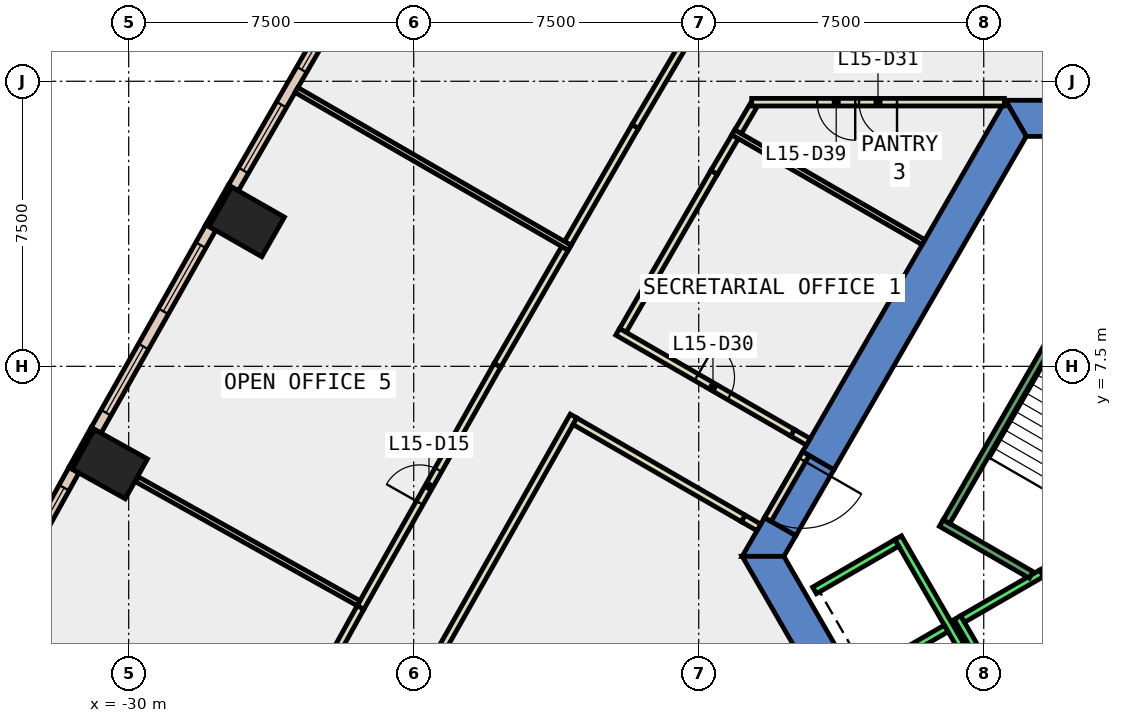
"""IFC4 building model, lengths in metres.
Left out: names, types, materials, properties, quantities, classifications, styles, units other than length and angle.
Written with IfcOpenShell. Run it as: python <this file> out.ifc"""

import sys

from ifc_helpers import new_model, si_unit, direction, frame, frame_2d, origin, origin_2d, place, context, subcontext, project, spatial, polyline, rectangle, outline, extrude, element, fill, save


model = new_model("IFC4")
c1 = context("Model", 3, precision=1e-05, world=origin(), true_north=direction((0.0, 1.0)))
c2 = subcontext(c1, "Body", "Model", "MODEL_VIEW")
j1 = project(units=[si_unit("LENGTHUNIT", "METRE"), si_unit("PLANEANGLEUNIT", "RADIAN")], contexts=[c1])
p1 = place(None, origin())
s1 = spatial("IfcSite", under=j1, at=p1, CompositionType="ELEMENT")
p2 = place(p1, origin())
s2 = spatial("IfcBuilding", under=s1, at=p2, CompositionType="ELEMENT")
p3 = place(p2, frame((0.0, 0.0, 72.8)))
s3 = spatial("IfcBuildingStorey", under=s2, at=p3, CompositionType="ELEMENT", Elevation=72.8)
for number, where, z_axis, x_axis in (
    (1, (-26.894, 11.301, -0.4), (0.0, 0.0, 1.0), (0.496, 0.869, 0.0)),
    (2, (-30.497, 4.928, -0.4), (0.0, 0.0, 1.0), (0.487, 0.873, 0.0)),
):
    element("IfcColumn", number, at=place(p3, frame(where, z_axis=z_axis, x_axis=x_axis)), inside=s3, PredefinedType="COLUMN", context=c2, shape_type="SweptSolid", body=[
        extrude(rectangle(XDim=1.2, YDim=1.6, at=origin_2d()), origin(), (0.0, 0.0, 1.0), 4.2),
    ])
p4 = place(p3, frame((0.0, 0.0, -0.4)))
e3 = element("IfcWall", 3, at=p4, inside=s3, PredefinedType="SHEAR", context=c2, shape_type="SweptSolid", body=[
    extrude(outline(polyline([(-4.55, 13.55), (-4.55, 14.5), (-6.928, 14.5), (-6.38, 13.55), (-4.55, 13.55)])), origin(), (0.0, 0.0, 1.0), 4.2),
])
p5 = place(p3, frame((0.0, 0.0, -0.4)))
e4 = element("IfcWall", 4, at=p5, inside=s3, PredefinedType="SHEAR", context=c2, shape_type="SweptSolid", body=[
    extrude(outline(polyline([(-12.267, 5.252), (-11.444, 4.777), (-6.38, 13.55), (-6.928, 14.5), (-12.267, 5.252)])), origin(), (0.0, 0.0, 1.0), 4.2),
])
p6 = place(p3, frame((0.0, 0.0, -0.4)))
e5 = element("IfcWall", 5, at=p6, inside=s3, PredefinedType="SHEAR", context=c2, shape_type="SweptSolid", body=[
    extrude(outline(polyline([(-12.444, 3.045), (-13.267, 3.52), (-13.856, 2.5), (-12.759, 2.5), (-12.444, 3.045)])), origin(), (0.0, 0.0, 1.0), 4.2),
])
p7 = place(p3, frame((0.0, 0.0, 3.6)))
e6 = element("IfcWall", 6, at=p7, inside=s3, PredefinedType="SHEAR", context=c2, shape_type="SweptSolid", body=[
    extrude(outline(polyline([(-13.267, 3.52), (-12.444, 3.045), (-11.444, 4.777), (-12.267, 5.252), (-13.267, 3.52)])), origin(), (0.0, 0.0, 1.0), 0.2),
])
p8 = place(p3, frame((0.0, 0.0, -0.4)))
e7 = element("IfcWall", 7, at=p8, inside=s3, PredefinedType="SHEAR", context=c2, shape_type="SweptSolid", body=[
    extrude(outline(polyline([(-13.856, 2.5), (-6.928, -9.5), (-6.38, -8.55), (-12.759, 2.5), (-13.856, 2.5)])), origin(), (0.0, 0.0, 1.0), 4.2),
])
p9 = place(p3, frame((-27.335, 12.243, 0.0), z_axis=(0.0, 0.0, 1.0), x_axis=(-0.495854054996, -0.868405870629, 0.0)))
e8 = element("IfcWall", 8, at=p9, inside=s3, PredefinedType="STANDARD", context=c2, shape_type="SweptSolid", body=[
    extrude(rectangle(XDim=1.2, YDim=0.1, at=frame_2d((0.6, 0.0))), origin(), (0.0, 0.0, 1.0), 3.8),
])
p10 = place(p3, frame((-30.947, 5.866, 0.0), z_axis=(0.0, 0.0, 1.0), x_axis=(-0.486817526853, -0.873503689488, 0.0)))
e9 = element("IfcWall", 9, at=p10, inside=s3, PredefinedType="STANDARD", context=c2, shape_type="SweptSolid", body=[
    extrude(rectangle(XDim=1.2, YDim=0.1, at=frame_2d((0.6, 0.0))), origin(), (0.0, 0.0, 1.0), 3.8),
])
p11 = place(p3, frame((-24.181, 17.5, 0.0), z_axis=(0.0, 0.0, 1.0), x_axis=(-0.499998239139, -0.866026420416, 0.0)))
e10 = element("IfcWall", 10, at=p11, inside=s3, PredefinedType="STANDARD", context=c2, shape_type="SweptSolid", body=[
    extrude(rectangle(XDim=6.13, YDim=0.3, at=frame_2d((3.065, 0.0))), origin(), (0.0, 0.0, 1.0), 3.8),
])
p12 = place(p11, frame((0.533, 0.0, 0.9)))
e11 = element("IfcOpeningElement", 11, at=p12, cuts=e10, PredefinedType="OPENING", context=c2, shape_type="SweptSolid", body=[
    extrude(rectangle(XDim=2.0, YDim=2.6, at=frame_2d((1.0, 1.3))), frame((0.0, 0.16, 0.0), z_axis=(0.0, -1.0, 0.0), x_axis=(1.0, 0.0, 0.0)), (0.0, 0.0, 1.0), 0.32),
])
p13 = place(p11, frame((3.598, 0.0, 0.9)))
e12 = element("IfcOpeningElement", 12, at=p13, cuts=e10, PredefinedType="OPENING", context=c2, shape_type="SweptSolid", body=[
    extrude(rectangle(XDim=2.0, YDim=2.6, at=frame_2d((1.0, 1.3))), frame((0.0, 0.16, 0.0), z_axis=(0.0, -1.0, 0.0), x_axis=(1.0, 0.0, 0.0)), (0.0, 0.0, 1.0), 0.32),
])
p14 = place(p3, frame((-27.84, 11.151, 0.0), z_axis=(0.0, 0.0, 1.0), x_axis=(-0.492097935349, -0.870539845168, 0.0)))
e13 = element("IfcWall", 13, at=p14, inside=s3, PredefinedType="STANDARD", context=c2, shape_type="SweptSolid", body=[
    extrude(rectangle(XDim=6.131, YDim=0.3, at=frame_2d((3.065, 0.0))), origin(), (0.0, 0.0, 1.0), 3.8),
])
p15 = place(p14, frame((0.533, 0.0, 0.9)))
e14 = element("IfcOpeningElement", 14, at=p15, cuts=e13, PredefinedType="OPENING", context=c2, shape_type="SweptSolid", body=[
    extrude(rectangle(XDim=2.0, YDim=2.6, at=frame_2d((1.0, 1.3))), frame((0.0, 0.16, 0.0), z_axis=(0.0, -1.0, 0.0), x_axis=(1.0, 0.0, 0.0)), (0.0, 0.0, 1.0), 0.32),
])
p16 = place(p14, frame((3.598, 0.0, 0.9)))
e15 = element("IfcOpeningElement", 15, at=p16, cuts=e13, PredefinedType="OPENING", context=c2, shape_type="SweptSolid", body=[
    extrude(rectangle(XDim=2.0, YDim=2.6, at=frame_2d((1.0, 1.3))), frame((0.0, 0.16, 0.0), z_axis=(0.0, -1.0, 0.0), x_axis=(1.0, 0.0, 0.0)), (0.0, 0.0, 1.0), 0.32),
])
p17 = place(p3, frame((-31.442, 4.769, 0.0), z_axis=(0.0, 0.0, 1.0), x_axis=(-0.484025698618, -0.875053782963, 0.0)))
e16 = element("IfcWall", 16, at=p17, inside=s3, PredefinedType="STANDARD", context=c2, shape_type="SweptSolid", body=[
    extrude(rectangle(XDim=6.13, YDim=0.3, at=frame_2d((3.065, 0.0))), origin(), (0.0, 0.0, 1.0), 3.8),
])
p18 = place(p17, frame((0.532, 0.0, 0.9)))
e17 = element("IfcOpeningElement", 17, at=p18, cuts=e16, PredefinedType="OPENING", context=c2, shape_type="SweptSolid", body=[
    extrude(rectangle(XDim=2.0, YDim=2.6, at=frame_2d((1.0, 1.3))), frame((0.0, 0.16, 0.0), z_axis=(0.0, -1.0, 0.0), x_axis=(1.0, 0.0, 0.0)), (0.0, 0.0, 1.0), 0.32),
])
p19 = place(p17, frame((3.597, 0.0, 0.9)))
e18 = element("IfcOpeningElement", 18, at=p19, cuts=e16, PredefinedType="OPENING", context=c2, shape_type="SweptSolid", body=[
    extrude(rectangle(XDim=2.0, YDim=2.6, at=frame_2d((1.0, 1.3))), frame((0.0, 0.16, 0.0), z_axis=(0.0, -1.0, 0.0), x_axis=(1.0, 0.0, 0.0)), (0.0, 0.0, 1.0), 0.32),
])
p20 = place(p3, frame((-14.042, 13.541, 0.0), z_axis=(0.0, 0.0, 1.0), x_axis=(-0.507733830316, -0.861513991501, 0.0)))
e19 = element("IfcWall", 19, at=p20, inside=s3, PredefinedType="PARTITIONING", context=c2, shape_type="SweptSolid", body=[
    extrude(rectangle(XDim=1.091, YDim=0.2, at=frame_2d((0.545, 0.0))), origin(), (0.0, 0.0, 1.0), 3.8),
])
p21 = place(p3, frame((-14.596, 12.601, 0.0), z_axis=(0.0, 0.0, 1.0), x_axis=(-0.500017431331, -0.866015339567, 0.0)))
e20 = element("IfcWall", 20, at=p21, inside=s3, PredefinedType="PARTITIONING", context=c2, shape_type="SweptSolid", body=[
    extrude(rectangle(XDim=4.8, YDim=0.2, at=frame_2d((2.4, 0.0))), origin(), (0.0, 0.0, 1.0), 3.8),
])
p22 = place(p3, frame((-17.133, 8.408, 0.0), z_axis=(0.0, 0.0, 1.0), x_axis=(0.866005140137, -0.500035096025, 0.0)))
e21 = element("IfcWall", 21, at=p22, inside=s3, PredefinedType="PARTITIONING", context=c2, shape_type="SweptSolid", body=[
    extrude(rectangle(XDim=5.317, YDim=0.2, at=frame_2d((2.659, 0.0))), origin(), (0.0, 0.0, 1.0), 3.8),
])
p23 = place(p22, frame((2.396, 0.0, 0.0)))
e22 = element("IfcOpeningElement", 22, at=p23, cuts=e21, PredefinedType="OPENING", context=c2, shape_type="SweptSolid", body=[
    extrude(rectangle(XDim=1.0, YDim=2.1, at=frame_2d((0.5, 1.05))), frame((0.0, 0.11, 0.0), z_axis=(0.0, -1.0, 0.0), x_axis=(1.0, 0.0, 0.0)), (0.0, 0.0, 1.0), 0.22),
])
p24 = place(p3, frame((-13.557, 14.364, 0.0), z_axis=(0.0, 0.0, 1.0), x_axis=(-0.507840899418, -0.861450881292, 0.0)))
e23 = element("IfcWall", 23, at=p24, inside=s3, PredefinedType="PARTITIONING", context=c2, shape_type="SweptSolid", body=[
    extrude(rectangle(XDim=0.806, YDim=0.2, at=frame_2d((0.403, 0.0))), origin(), (0.0, 0.0, 1.0), 3.8),
])
p25 = place(p3, frame((-13.417, 3.26, 0.0), z_axis=(0.0, 0.0, 1.0), x_axis=(-0.865929261247, 0.500166486798, 0.0)))
e24 = element("IfcWall", 24, at=p25, inside=s3, PredefinedType="PARTITIONING", context=c2, shape_type="SweptSolid", body=[
    extrude(rectangle(XDim=0.476, YDim=0.2, at=frame_2d((0.238, 0.0))), origin(), (0.0, 0.0, 1.0), 2.4),
])
p26 = place(p3, frame((-18.295, 6.192, 0.0), z_axis=(0.0, 0.0, 1.0), x_axis=(-0.492193980341, -0.870485545954, 0.0)))
e25 = element("IfcWall", 25, at=p26, inside=s3, PredefinedType="PARTITIONING", context=c2, shape_type="SweptSolid", body=[
    extrude(rectangle(XDim=7.06, YDim=0.2, at=frame_2d((3.53, 0.0))), origin(), (0.0, 0.0, 1.0), 3.8),
])
p27 = place(p3, frame((-18.445, 10.734, 0.0), z_axis=(0.0, 0.0, 1.0), x_axis=(0.499900903336, 0.866082609711, 0.0)))
e26 = element("IfcWall", 26, at=p27, inside=s3, PredefinedType="PARTITIONING", context=c2, shape_type="SweptSolid", body=[
    extrude(rectangle(XDim=3.553, YDim=0.2, at=frame_2d((1.776, 0.0))), origin(), (0.0, 0.0, 1.0), 3.8),
])
p28 = place(p3, frame((-16.669, 13.811, 0.0), z_axis=(0.0, 0.0, 1.0), x_axis=(0.507777955495, 0.861487984776, 0.0)))
e27 = element("IfcWall", 27, at=p28, inside=s3, PredefinedType="PARTITIONING", context=c2, shape_type="SweptSolid", body=[
    extrude(rectangle(XDim=7.178, YDim=0.2, at=frame_2d((3.589, 0.0))), origin(), (0.0, 0.0, 1.0), 3.8),
])
p29 = place(p28, frame((3.164, 0.0, 0.0)))
e28 = element("IfcOpeningElement", 28, at=p29, cuts=e27, PredefinedType="OPENING", context=c2, shape_type="SweptSolid", body=[
    extrude(rectangle(XDim=1.0, YDim=2.1, at=frame_2d((0.5, 1.05))), frame((0.0, 0.11, 0.0), z_axis=(0.0, -1.0, 0.0), x_axis=(1.0, 0.0, 0.0)), (0.0, 0.0, 1.0), 0.22),
])
p30 = place(p3, frame((-23.901, 1.152, 0.0), z_axis=(0.0, 0.0, 1.0), x_axis=(0.492063845089, 0.870559114797, 0.0)))
e29 = element("IfcWall", 29, at=p30, inside=s3, PredefinedType="PARTITIONING", context=c2, shape_type="SweptSolid", body=[
    extrude(rectangle(XDim=7.326, YDim=0.2, at=frame_2d((3.663, 0.0))), origin(), (0.0, 0.0, 1.0), 3.8),
])
p31 = place(p30, frame((3.163, 0.0, 0.0)))
e30 = element("IfcOpeningElement", 30, at=p31, cuts=e29, PredefinedType="OPENING", context=c2, shape_type="SweptSolid", body=[
    extrude(rectangle(XDim=1.0, YDim=2.1, at=frame_2d((0.5, 1.05))), frame((0.0, 0.11, 0.0), z_axis=(0.0, -1.0, 0.0), x_axis=(1.0, 0.0, 0.0)), (0.0, 0.0, 1.0), 0.22),
])
p32 = place(p3, frame((-20.296, 7.53, 0.0), z_axis=(0.0, 0.0, 1.0), x_axis=(0.500236350306, 0.865888903863, 0.0)))
e31 = element("IfcWall", 31, at=p32, inside=s3, PredefinedType="PARTITIONING", context=c2, shape_type="SweptSolid", body=[
    extrude(rectangle(XDim=3.55, YDim=0.2, at=frame_2d((1.775, 0.0))), origin(), (0.0, 0.0, 1.0), 3.8),
])
p33 = place(p3, frame((-27.375, -5.128, 0.0), z_axis=(0.0, 0.0, 1.0), x_axis=(0.484068035355, 0.875030363558, 0.0)))
e32 = element("IfcWall", 32, at=p33, inside=s3, PredefinedType="PARTITIONING", context=c2, shape_type="SweptSolid", body=[
    extrude(rectangle(XDim=7.177, YDim=0.2, at=frame_2d((3.588, 0.0))), origin(), (0.0, 0.0, 1.0), 3.8),
])
p34 = place(p33, frame((3.163, 0.0, 0.0)))
e33 = element("IfcOpeningElement", 33, at=p34, cuts=e32, PredefinedType="OPENING", context=c2, shape_type="SweptSolid", body=[
    extrude(rectangle(XDim=1.0, YDim=2.1, at=frame_2d((0.5, 1.05))), frame((0.0, 0.11, 0.0), z_axis=(0.0, -1.0, 0.0), x_axis=(1.0, 0.0, 0.0)), (0.0, 0.0, 1.0), 0.22),
])
p35 = place(p3, frame((-14.091, 13.655, 0.0), z_axis=(0.0, 0.0, 1.0), x_axis=(0.866035778077, -0.499982030767, 0.0)))
e34 = element("IfcWall", 34, at=p35, inside=s3, PredefinedType="PARTITIONING", context=c2, shape_type="SweptSolid", body=[
    extrude(rectangle(XDim=5.781, YDim=0.15, at=frame_2d((2.89, 0.0))), origin(), (0.0, 0.0, 1.0), 3.8),
])
p36 = place(p3, frame((-6.957, 14.45, 0.0), z_axis=(0.0, 0.0, 1.0), x_axis=(-1.0, 0.0, 0.0)))
e35 = element("IfcWall", 35, at=p36, inside=s3, PredefinedType="PARTITIONING", context=c2, shape_type="SweptSolid", body=[
    extrude(rectangle(XDim=6.649, YDim=0.2, at=frame_2d((3.324, 0.0))), origin(), (0.0, 0.0, 1.0), 3.8),
])
p37 = place(p36, frame((2.825, 0.0, 0.0)))
e36 = element("IfcOpeningElement", 36, at=p37, cuts=e35, PredefinedType="OPENING", context=c2, shape_type="SweptSolid", body=[
    extrude(rectangle(XDim=1.0, YDim=2.1, at=frame_2d((0.5, 1.05))), frame((0.0, 0.11, 0.0), z_axis=(0.0, -1.0, 0.0), x_axis=(1.0, 0.0, 0.0)), (0.0, 0.0, 1.0), 0.22),
])
p38 = place(p36, frame((3.925, 0.0, 0.0)))
e37 = element("IfcOpeningElement", 37, at=p38, cuts=e35, PredefinedType="OPENING", context=c2, shape_type="SweptSolid", body=[
    extrude(rectangle(XDim=1.0, YDim=2.1, at=frame_2d((0.5, 1.05))), frame((0.0, 0.11, 0.0), z_axis=(0.0, -1.0, 0.0), x_axis=(1.0, 0.0, 0.0)), (0.0, 0.0, 1.0), 0.22),
])
p39 = place(p3, frame((-18.396, 10.619, 0.0), z_axis=(0.0, 0.0, 1.0), x_axis=(-0.865966132161, 0.500102647413, 0.0)))
e38 = element("IfcWall", 38, at=p39, inside=s3, PredefinedType="PARTITIONING", context=c2, shape_type="SweptSolid", body=[
    extrude(rectangle(XDim=8.301, YDim=0.15, at=frame_2d((4.15, 0.0))), origin(), (0.0, 0.0, 1.0), 3.8),
])
p40 = place(p3, frame((-23.951, 1.266, 0.0), z_axis=(0.0, 0.0, 1.0), x_axis=(-0.872786908026, 0.488101437385, 0.0)))
e39 = element("IfcWall", 39, at=p40, inside=s3, PredefinedType="PARTITIONING", context=c2, shape_type="SweptSolid", body=[
    extrude(rectangle(XDim=6.681, YDim=0.15, at=frame_2d((3.34, 0.0))), origin(), (0.0, 0.0, 1.0), 3.8),
])
p41 = place(p3, frame((-12.18, 5.202, 0.0), z_axis=(0.0, 0.0, 1.0), x_axis=(-0.50002537861, -0.866010750942, 0.0)))
e40 = element("IfcWall", 40, at=p41, inside=s3, PredefinedType="PARTITIONING", context=c2, shape_type="SweptSolid", body=[
    extrude(rectangle(XDim=2.0, YDim=0.2, at=frame_2d((1.0, 0.0))), origin(), (0.0, 0.0, 1.0), 2.4),
])
p42 = place(p41, frame((0.19, 0.0, 0.0)))
e41 = element("IfcOpeningElement", 41, at=p42, cuts=e40, PredefinedType="OPENING", context=c2, shape_type="SweptSolid", body=[
    extrude(rectangle(XDim=1.8, YDim=2.1, at=frame_2d((0.9, 1.05))), frame((0.0, 0.11, 0.0), z_axis=(0.0, -1.0, 0.0), x_axis=(1.0, 0.0, 0.0)), (0.0, 0.0, 1.0), 0.22),
])
p43 = place(p3, frame((-12.528, 5.749, 0.0), z_axis=(0.0, 0.0, 1.0), x_axis=(0.866305462299, -0.499514610387, 0.0)))
e42 = element("IfcWall", 42, at=p43, inside=s3, PredefinedType="PARTITIONING", context=c2, shape_type="SweptSolid", body=[
    extrude(rectangle(XDim=0.475, YDim=0.2, at=frame_2d((0.237, 0.0))), origin(), (0.0, 0.0, 1.0), 2.4),
])
p44 = place(p3, frame((-13.829, 3.498, 0.0), z_axis=(0.0, 0.0, 1.0), x_axis=(-0.866040105854, 0.499974534403, 0.0)))
e43 = element("IfcWall", 43, at=p44, inside=s3, PredefinedType="PARTITIONING", context=c2, shape_type="SweptSolid", body=[
    extrude(rectangle(XDim=5.114, YDim=0.2, at=frame_2d((2.557, 0.0))), origin(), (0.0, 0.0, 1.0), 3.8),
])
p45 = place(p3, frame((-5.94, 2.188, 0.0), z_axis=(0.0, 0.0, 1.0), x_axis=(0.49994636267, -0.866056369097, 0.0)))
e44 = element("IfcWall", 44, at=p45, inside=s3, PredefinedType="STANDARD", context=c2, shape_type="SweptSolid", body=[
    extrude(rectangle(XDim=2.8, YDim=0.2, at=frame_2d((1.4, 0.0))), origin(), (0.0, 0.0, 1.0), 3.8),
])
p46 = place(p45, frame((1.225, 0.0, 0.0)))
e45 = element("IfcOpeningElement", 45, at=p46, cuts=e44, PredefinedType="OPENING", context=c2, shape_type="SweptSolid", body=[
    extrude(rectangle(XDim=1.1, YDim=2.1, at=frame_2d((0.55, 1.05))), frame((0.0, 0.11, 0.0), z_axis=(0.0, -1.0, 0.0), x_axis=(1.0, 0.0, 0.0)), (0.0, 0.0, 1.0), 0.22),
])
p47 = place(p3, frame((-8.192, 0.888, 0.0), z_axis=(0.0, 0.0, 1.0), x_axis=(0.49994636267, -0.866056369097, 0.0)))
e46 = element("IfcWall", 46, at=p47, inside=s3, PredefinedType="STANDARD", context=c2, shape_type="SweptSolid", body=[
    extrude(rectangle(XDim=2.8, YDim=0.2, at=frame_2d((1.4, 0.0))), origin(), (0.0, 0.0, 1.0), 3.8),
])
p48 = place(p3, frame((-5.977, 2.052, 0.0), z_axis=(0.0, 0.0, 1.0), x_axis=(-0.865973769406, -0.500089422704, 0.0)))
e47 = element("IfcWall", 47, at=p48, inside=s3, PredefinedType="STANDARD", context=c2, shape_type="SweptSolid", body=[
    extrude(rectangle(XDim=2.399, YDim=0.2, at=frame_2d((1.2, 0.0))), origin(), (0.0, 0.0, 1.0), 3.8),
])
p49 = place(p3, frame((-9.751, 2.99, 0.0), z_axis=(0.0, 0.0, 1.0), x_axis=(0.50000090737, -0.866024879913, 0.0)))
e48 = element("IfcWall", 48, at=p49, inside=s3, PredefinedType="STANDARD", context=c2, shape_type="SweptSolid", body=[
    extrude(rectangle(XDim=10.6, YDim=0.2, at=frame_2d((5.3, 0.0))), origin(), (0.0, 0.0, 1.0), 3.8),
])
p50 = place(p3, frame((-9.788, 2.853, 0.0), z_axis=(0.0, 0.0, 1.0), x_axis=(-0.865998541277, -0.500046524342, 0.0)))
e49 = element("IfcWall", 49, at=p50, inside=s3, PredefinedType="STANDARD", context=c2, shape_type="SweptSolid", body=[
    extrude(rectangle(XDim=2.5, YDim=0.2, at=frame_2d((1.25, 0.0))), origin(), (0.0, 0.0, 1.0), 3.8),
])
p51 = place(p3, frame((-8.488, 0.602, 0.0), z_axis=(0.0, 0.0, 1.0), x_axis=(-0.866022959057, -0.500004234368, 0.0)))
e50 = element("IfcWall", 50, at=p51, inside=s3, PredefinedType="STANDARD", context=c2, shape_type="SweptSolid", body=[
    extrude(rectangle(XDim=2.5, YDim=0.2, at=frame_2d((1.25, 0.0))), origin(), (0.0, 0.0, 1.0), 3.8),
])
p52 = place(p3, frame((-6.25, 2.01, 0.0), z_axis=(0.0, 0.0, 1.0), x_axis=(-0.86611865017, 0.499838457731, 0.0)))
e51 = element("IfcWall", 51, at=p52, inside=s3, PredefinedType="STANDARD", context=c2, shape_type="SweptSolid", body=[
    extrude(rectangle(XDim=2.733, YDim=0.2, at=frame_2d((1.366, 0.0))), origin(), (0.0, 0.0, 1.0), 3.8),
])
p53 = place(p3, frame((-5.03, 9.388, 0.0), z_axis=(0.0, 0.0, 1.0), x_axis=(-0.499978703459, -0.866037698999, 0.0)))
e52 = element("IfcWall", 52, at=p53, inside=s3, PredefinedType="STANDARD", context=c2, shape_type="SweptSolid", body=[
    extrude(rectangle(XDim=6.9, YDim=0.2, at=frame_2d((3.45, 0.0))), origin(), (0.0, 0.0, 1.0), 3.8),
])
p54 = place(p12, origin())
e53 = element("IfcWindow", 53, at=p54, inside=s3, PartitioningType="SINGLE_PANEL", PredefinedType="WINDOW", context=c2, shape_type="SweptSolid", body=[
    extrude(rectangle(XDim=2.0, YDim=2.6, at=frame_2d((1.0, 1.3))), frame((0.0, 0.03, 0.0), z_axis=(0.0, -1.0, 0.0), x_axis=(1.0, 0.0, 0.0)), (0.0, 0.0, 1.0), 0.06),
])
fill(e11, e53)
p55 = place(p13, origin())
e54 = element("IfcWindow", 54, at=p55, inside=s3, PartitioningType="SINGLE_PANEL", PredefinedType="WINDOW", context=c2, shape_type="SweptSolid", body=[
    extrude(rectangle(XDim=2.0, YDim=2.6, at=frame_2d((1.0, 1.3))), frame((0.0, 0.03, 0.0), z_axis=(0.0, -1.0, 0.0), x_axis=(1.0, 0.0, 0.0)), (0.0, 0.0, 1.0), 0.06),
])
fill(e12, e54)
p56 = place(p15, origin())
e55 = element("IfcWindow", 55, at=p56, inside=s3, PartitioningType="SINGLE_PANEL", PredefinedType="WINDOW", context=c2, shape_type="SweptSolid", body=[
    extrude(rectangle(XDim=2.0, YDim=2.6, at=frame_2d((1.0, 1.3))), frame((0.0, 0.03, 0.0), z_axis=(0.0, -1.0, 0.0), x_axis=(1.0, 0.0, 0.0)), (0.0, 0.0, 1.0), 0.06),
])
fill(e14, e55)
p57 = place(p16, origin())
e56 = element("IfcWindow", 56, at=p57, inside=s3, PartitioningType="SINGLE_PANEL", PredefinedType="WINDOW", context=c2, shape_type="SweptSolid", body=[
    extrude(rectangle(XDim=2.0, YDim=2.6, at=frame_2d((1.0, 1.3))), frame((0.0, 0.03, 0.0), z_axis=(0.0, -1.0, 0.0), x_axis=(1.0, 0.0, 0.0)), (0.0, 0.0, 1.0), 0.06),
])
fill(e15, e56)
p58 = place(p18, origin())
e57 = element("IfcWindow", 57, at=p58, inside=s3, PartitioningType="SINGLE_PANEL", PredefinedType="WINDOW", context=c2, shape_type="SweptSolid", body=[
    extrude(rectangle(XDim=2.0, YDim=2.6, at=frame_2d((1.0, 1.3))), frame((0.0, 0.03, 0.0), z_axis=(0.0, -1.0, 0.0), x_axis=(1.0, 0.0, 0.0)), (0.0, 0.0, 1.0), 0.06),
])
fill(e17, e57)
p59 = place(p31, origin())
e58 = element("IfcDoor", 58, at=p59, inside=s3, OperationType="SINGLE_SWING_LEFT", PredefinedType="DOOR", context=c2, shape_type="SweptSolid", body=[
    extrude(rectangle(XDim=1.0, YDim=2.1, at=frame_2d((0.5, 1.05))), frame((0.0, 0.025, 0.0), z_axis=(0.0, -1.0, 0.0), x_axis=(1.0, 0.0, 0.0)), (0.0, 0.0, 1.0), 0.05),
])
fill(e30, e58)
p60 = place(p23, origin())
e59 = element("IfcDoor", 59, at=p60, inside=s3, OperationType="SINGLE_SWING_LEFT", PredefinedType="DOOR", context=c2, shape_type="SweptSolid", body=[
    extrude(rectangle(XDim=1.0, YDim=2.1, at=frame_2d((0.5, 1.05))), frame((0.0, 0.025, 0.0), z_axis=(0.0, -1.0, 0.0), x_axis=(1.0, 0.0, 0.0)), (0.0, 0.0, 1.0), 0.05),
])
fill(e22, e59)
p61 = place(p37, origin())
e60 = element("IfcDoor", 60, at=p61, inside=s3, OperationType="SINGLE_SWING_LEFT", PredefinedType="DOOR", context=c2, shape_type="SweptSolid", body=[
    extrude(rectangle(XDim=1.0, YDim=2.1, at=frame_2d((0.5, 1.05))), frame((0.0, 0.025, 0.0), z_axis=(0.0, -1.0, 0.0), x_axis=(1.0, 0.0, 0.0)), (0.0, 0.0, 1.0), 0.05),
])
fill(e36, e60)
p62 = place(p38, origin())
e61 = element("IfcDoor", 61, at=p62, inside=s3, OperationType="SINGLE_SWING_RIGHT", PredefinedType="DOOR", context=c2, shape_type="SweptSolid", body=[
    extrude(rectangle(XDim=1.0, YDim=2.1, at=frame_2d((0.5, 1.05))), frame((0.0, 0.025, 0.0), z_axis=(0.0, -1.0, 0.0), x_axis=(1.0, 0.0, 0.0)), (0.0, 0.0, 1.0), 0.05),
])
fill(e37, e61)
p63 = place(p42, origin())
e62 = element("IfcDoor", 62, at=p63, inside=s3, OperationType="DOUBLE_DOOR_SINGLE_SWING", PredefinedType="DOOR", context=c2, shape_type="SweptSolid", body=[
    extrude(rectangle(XDim=1.8, YDim=2.1, at=frame_2d((0.9, 1.05))), frame((0.0, 0.025, 0.0), z_axis=(0.0, -1.0, 0.0), x_axis=(1.0, 0.0, 0.0)), (0.0, 0.0, 1.0), 0.05),
])
fill(e41, e62)
save(model, sys.argv[1])
